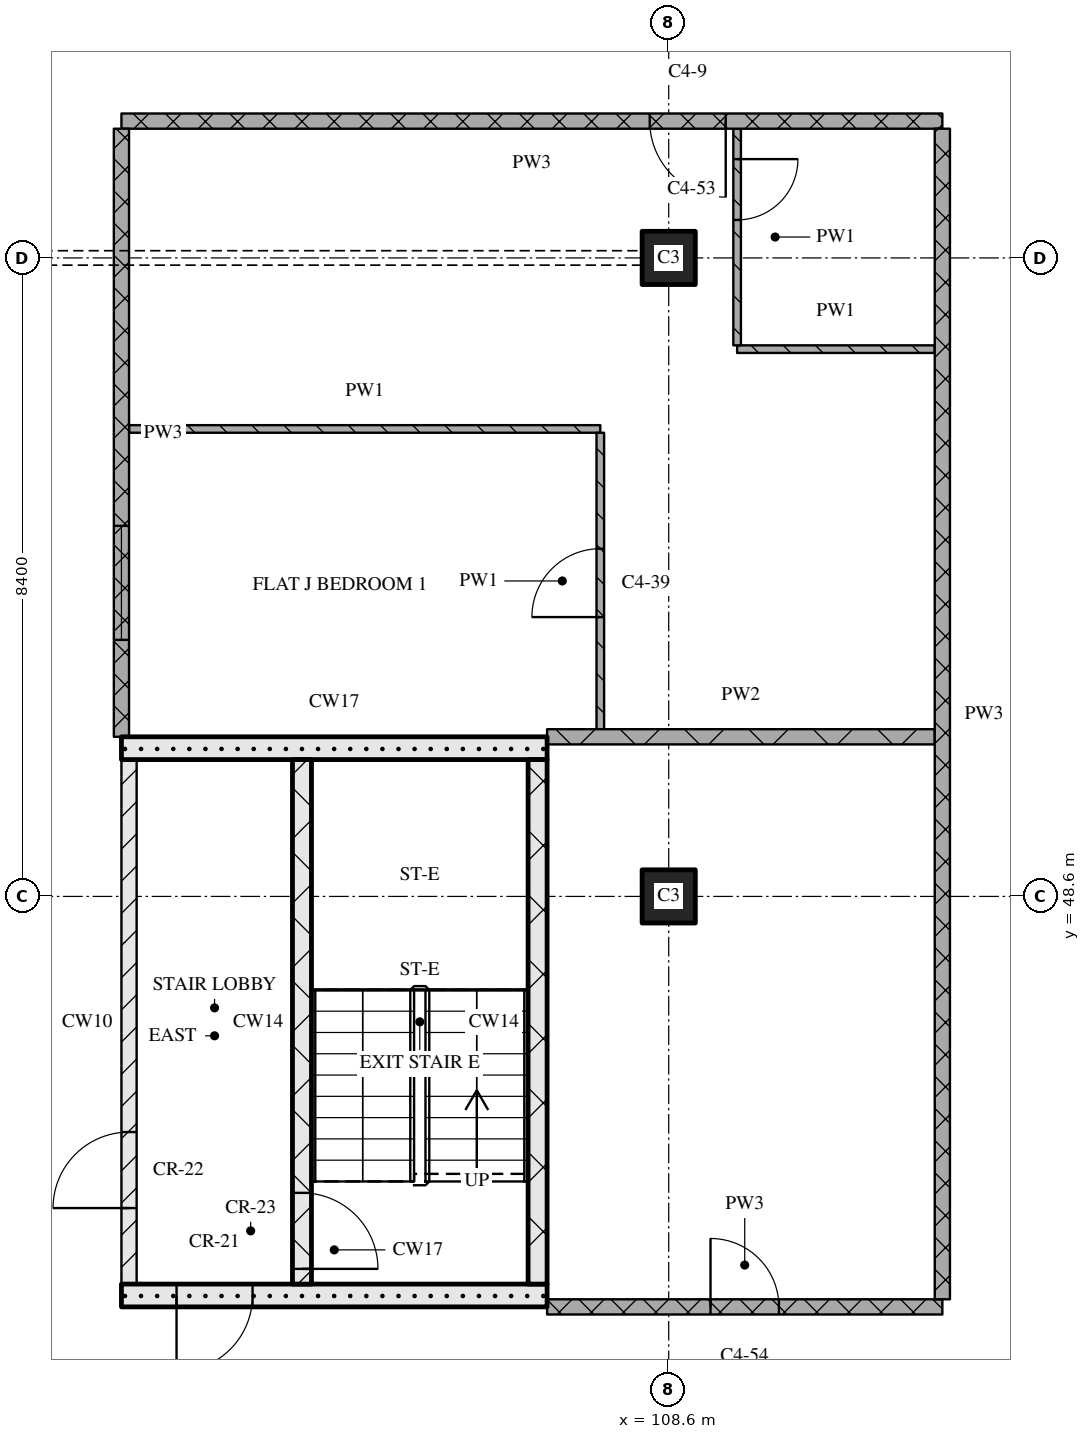
"""IFC4 building model, lengths in metres.
Left out: names, types, materials, properties, quantities, classifications, styles, units other than length and angle.
Written with IfcOpenShell. Run it as: python <this file> out.ifc"""

import sys

from ifc_helpers import new_model, si_unit, direction, frame, frame_2d, origin, origin_2d, place, context, subcontext, project, spatial, rectangle, extrude, element, fill, save


model = new_model("IFC4")
c1 = context("Model", 3, precision=1e-05, world=origin(), true_north=direction((0.0, 1.0)))
c2 = subcontext(c1, "Body", "Model", "MODEL_VIEW")
j1 = project(units=[si_unit("LENGTHUNIT", "METRE"), si_unit("PLANEANGLEUNIT", "RADIAN")], contexts=[c1])
p1 = place(None, origin())
s1 = spatial("IfcSite", under=j1, at=p1, CompositionType="ELEMENT")
p2 = place(p1, origin())
s2 = spatial("IfcBuilding", under=s1, at=p2, CompositionType="ELEMENT")
p3 = place(p2, frame((0.0, 0.0, 183.45)))
s3 = spatial("IfcBuildingStorey", under=s2, at=p3, CompositionType="ELEMENT", Elevation=183.45)
for number, where, z_axis, x_axis in (
    (1, (108.6, 48.6, 0.0), (0.0, 0.0, 1.0), (1.0, 0.0, 0.0)),
    (2, (108.6, 57.0, 0.0), (0.0, 0.0, 1.0), (1.0, 0.0, 0.0)),
):
    element("IfcColumn", number, at=place(p3, frame(where, z_axis=z_axis, x_axis=x_axis)), inside=s3, PredefinedType="COLUMN", context=c2, shape_type="SweptSolid", body=[
        extrude(rectangle(XDim=0.7, YDim=0.7, at=origin_2d()), origin(), (0.0, 0.0, 1.0), 3.6),
    ])
p4 = place(p3, frame((101.4, 43.35, 0.0), z_axis=(0.0, 0.0, 1.0), x_axis=(1.0, 0.0, 0.0)))
e3 = element("IfcWall", 3, at=p4, inside=s3, PredefinedType="SOLIDWALL", context=c2, shape_type="SweptSolid", body=[
    extrude(rectangle(XDim=5.6, YDim=0.3, at=frame_2d((2.8, 0.0))), origin(), (0.0, 0.0, 1.0), 3.32),
])
p5 = place(p4, frame((0.725, 0.0, 0.0)))
e4 = element("IfcOpeningElement", 4, at=p5, cuts=e3, PredefinedType="OPENING", context=c2, shape_type="SweptSolid", body=[
    extrude(rectangle(XDim=1.0, YDim=2.1, at=frame_2d((0.5, 1.05))), frame((0.0, 0.16, 0.0), z_axis=(0.0, -1.0, 0.0), x_axis=(1.0, 0.0, 0.0)), (0.0, 0.0, 1.0), 0.32),
])
p6 = place(p3, frame((101.5, 43.5, 0.0), z_axis=(0.0, 0.0, 1.0), x_axis=(0.0, 1.0, 0.0)))
e5 = element("IfcWall", 5, at=p6, inside=s3, PredefinedType="PARTITIONING", context=c2, shape_type="SweptSolid", body=[
    extrude(rectangle(XDim=6.9, YDim=0.2, at=frame_2d((3.45, 0.0))), origin(), (0.0, 0.0, 1.0), 3.32),
])
p7 = place(p6, frame((1.0, 0.0, 0.0)))
e6 = element("IfcOpeningElement", 6, at=p7, cuts=e5, PredefinedType="OPENING", context=c2, shape_type="SweptSolid", body=[
    extrude(rectangle(XDim=1.0, YDim=2.1, at=frame_2d((0.5, 1.05))), frame((0.0, 0.11, 0.0), z_axis=(0.0, -1.0, 0.0), x_axis=(1.0, 0.0, 0.0)), (0.0, 0.0, 1.0), 0.22),
])
p8 = place(p3, frame((103.775, 43.5, 0.0), z_axis=(0.0, 0.0, 1.0), x_axis=(0.0, 1.0, 0.0)))
e7 = element("IfcWall", 7, at=p8, inside=s3, PredefinedType="SOLIDWALL", context=c2, shape_type="SweptSolid", body=[
    extrude(rectangle(XDim=6.9, YDim=0.25, at=frame_2d((3.45, 0.0))), origin(), (0.0, 0.0, 1.0), 3.32),
])
p9 = place(p8, frame((0.2, 0.0, 0.0)))
e8 = element("IfcOpeningElement", 8, at=p9, cuts=e7, PredefinedType="OPENING", context=c2, shape_type="SweptSolid", body=[
    extrude(rectangle(XDim=1.0, YDim=2.1, at=frame_2d((0.5, 1.05))), frame((0.0, 0.135, 0.0), z_axis=(0.0, -1.0, 0.0), x_axis=(1.0, 0.0, 0.0)), (0.0, 0.0, 1.0), 0.27),
])
p10 = place(p3, frame((106.875, 43.5, 0.0), z_axis=(0.0, 0.0, 1.0), x_axis=(0.0, 1.0, 0.0)))
e9 = element("IfcWall", 9, at=p10, inside=s3, PredefinedType="SOLIDWALL", context=c2, shape_type="SweptSolid", body=[
    extrude(rectangle(XDim=6.9, YDim=0.25, at=frame_2d((3.45, 0.0))), origin(), (0.0, 0.0, 1.0), 3.32),
])
p11 = place(p3, frame((101.4, 50.55, 0.0), z_axis=(0.0, 0.0, 1.0), x_axis=(1.0, 0.0, 0.0)))
e10 = element("IfcWall", 10, at=p11, inside=s3, PredefinedType="SOLIDWALL", context=c2, shape_type="SweptSolid", body=[
    extrude(rectangle(XDim=5.6, YDim=0.3, at=frame_2d((2.8, 0.0))), origin(), (0.0, 0.0, 1.0), 3.32),
])
p12 = place(p3, frame((107.0, 43.2, 0.0), z_axis=(0.0, 0.0, 1.0), x_axis=(1.0, 0.0, 0.0)))
e11 = element("IfcWall", 11, at=p12, inside=s3, PredefinedType="PARTITIONING", context=c2, shape_type="SweptSolid", body=[
    extrude(rectangle(XDim=5.2, YDim=0.2, at=frame_2d((2.6, 0.0))), origin(), (0.0, 0.0, 1.0), 3.32),
])
p13 = place(p12, frame((2.15, 0.0, 0.0)))
e12 = element("IfcOpeningElement", 12, at=p13, cuts=e11, PredefinedType="OPENING", context=c2, shape_type="SweptSolid", body=[
    extrude(rectangle(XDim=0.9, YDim=2.1, at=frame_2d((0.45, 1.05))), frame((0.0, 0.11, 0.0), z_axis=(0.0, -1.0, 0.0), x_axis=(1.0, 0.0, 0.0)), (0.0, 0.0, 1.0), 0.22),
])
p14 = place(p3, frame((107.0, 50.7, 0.0), z_axis=(0.0, 0.0, 1.0), x_axis=(1.0, 0.0, 0.0)))
e13 = element("IfcWall", 13, at=p14, inside=s3, PredefinedType="PARTITIONING", context=c2, shape_type="SweptSolid", body=[
    extrude(rectangle(XDim=5.1, YDim=0.2, at=frame_2d((2.55, 0.0))), origin(), (0.0, 0.0, 1.0), 3.32),
])
p15 = place(p3, frame((101.5, 54.75, 0.0), z_axis=(0.0, 0.0, 1.0), x_axis=(1.0, 0.0, 0.0)))
e14 = element("IfcWall", 14, at=p15, inside=s3, PredefinedType="PARTITIONING", context=c2, shape_type="SweptSolid", body=[
    extrude(rectangle(XDim=6.2, YDim=0.1, at=frame_2d((3.1, 0.0))), origin(), (0.0, 0.0, 1.0), 3.32),
])
p16 = place(p3, frame((109.5, 55.8, 0.0), z_axis=(0.0, 0.0, 1.0), x_axis=(1.0, 0.0, 0.0)))
e15 = element("IfcWall", 15, at=p16, inside=s3, PredefinedType="PARTITIONING", context=c2, shape_type="SweptSolid", body=[
    extrude(rectangle(XDim=2.6, YDim=0.1, at=frame_2d((1.3, 0.0))), origin(), (0.0, 0.0, 1.0), 3.32),
])
p17 = place(p3, frame((112.2, 58.8, 0.0), z_axis=(0.0, 0.0, 1.0), x_axis=(-1.0, 0.0, 0.0)))
e16 = element("IfcWall", 16, at=p17, inside=s3, PredefinedType="PARTITIONING", context=c2, shape_type="SweptSolid", body=[
    extrude(rectangle(XDim=10.8, YDim=0.2, at=frame_2d((5.4, 0.0))), origin(), (0.0, 0.0, 1.0), 3.32),
])
p18 = place(p17, frame((2.85, 0.0, 0.0)))
e17 = element("IfcOpeningElement", 17, at=p18, cuts=e16, PredefinedType="OPENING", context=c2, shape_type="SweptSolid", body=[
    extrude(rectangle(XDim=1.0, YDim=2.1, at=frame_2d((0.5, 1.05))), frame((0.0, 0.11, 0.0), z_axis=(0.0, -1.0, 0.0), x_axis=(1.0, 0.0, 0.0)), (0.0, 0.0, 1.0), 0.22),
])
p19 = place(p3, frame((101.4, 58.7, 0.0), z_axis=(0.0, 0.0, 1.0), x_axis=(0.0, -1.0, 0.0)))
e18 = element("IfcWall", 18, at=p19, inside=s3, PredefinedType="PARTITIONING", context=c2, shape_type="SweptSolid", body=[
    extrude(rectangle(XDim=8.0, YDim=0.2, at=frame_2d((4.0, 0.0))), origin(), (0.0, 0.0, 1.0), 3.32),
])
p20 = place(p19, frame((5.225, 0.0, 0.9)))
e19 = element("IfcOpeningElement", 19, at=p20, cuts=e18, PredefinedType="OPENING", context=c2, shape_type="SweptSolid", body=[
    extrude(rectangle(XDim=1.5, YDim=1.5, at=frame_2d((0.75, 0.75))), frame((0.0, 0.11, 0.0), z_axis=(0.0, -1.0, 0.0), x_axis=(1.0, 0.0, 0.0)), (0.0, 0.0, 1.0), 0.22),
])
p21 = place(p3, frame((107.7, 50.8, 0.0), z_axis=(0.0, 0.0, 1.0), x_axis=(0.0, 1.0, 0.0)))
e20 = element("IfcWall", 20, at=p21, inside=s3, PredefinedType="PARTITIONING", context=c2, shape_type="SweptSolid", body=[
    extrude(rectangle(XDim=3.9, YDim=0.1, at=frame_2d((1.95, 0.0))), origin(), (0.0, 0.0, 1.0), 3.32),
])
p22 = place(p21, frame((1.475, 0.0, 0.0)))
e21 = element("IfcOpeningElement", 21, at=p22, cuts=e20, PredefinedType="OPENING", context=c2, shape_type="SweptSolid", body=[
    extrude(rectangle(XDim=0.9, YDim=2.1, at=frame_2d((0.45, 1.05))), frame((0.0, 0.06, 0.0), z_axis=(0.0, -1.0, 0.0), x_axis=(1.0, 0.0, 0.0)), (0.0, 0.0, 1.0), 0.12),
])
p23 = place(p3, frame((109.5, 58.7, 0.0), z_axis=(0.0, 0.0, 1.0), x_axis=(0.0, -1.0, 0.0)))
e22 = element("IfcWall", 22, at=p23, inside=s3, PredefinedType="PARTITIONING", context=c2, shape_type="SweptSolid", body=[
    extrude(rectangle(XDim=2.85, YDim=0.1, at=frame_2d((1.425, 0.0))), origin(), (0.0, 0.0, 1.0), 3.32),
])
p24 = place(p23, frame((0.4, 0.0, 0.0)))
e23 = element("IfcOpeningElement", 23, at=p24, cuts=e22, PredefinedType="OPENING", context=c2, shape_type="SweptSolid", body=[
    extrude(rectangle(XDim=0.8, YDim=2.1, at=frame_2d((0.4, 1.05))), frame((0.0, 0.06, 0.0), z_axis=(0.0, -1.0, 0.0), x_axis=(1.0, 0.0, 0.0)), (0.0, 0.0, 1.0), 0.12),
])
p25 = place(p3, frame((112.2, 58.7, 0.0), z_axis=(0.0, 0.0, 1.0), x_axis=(0.0, -1.0, 0.0)))
e24 = element("IfcWall", 24, at=p25, inside=s3, PredefinedType="PARTITIONING", context=c2, shape_type="SweptSolid", body=[
    extrude(rectangle(XDim=15.4, YDim=0.2, at=frame_2d((7.7, 0.0))), origin(), (0.0, 0.0, 1.0), 3.32),
])
p26 = place(p5, origin())
e25 = element("IfcDoor", 25, at=p26, inside=s3, OperationType="SINGLE_SWING_RIGHT", PredefinedType="DOOR", context=c2, shape_type="SweptSolid", body=[
    extrude(rectangle(XDim=1.0, YDim=2.1, at=frame_2d((0.5, 1.05))), frame((0.0, 0.025, 0.0), z_axis=(0.0, -1.0, 0.0), x_axis=(1.0, 0.0, 0.0)), (0.0, 0.0, 1.0), 0.05),
])
fill(e4, e25)
p27 = place(p9, origin())
e26 = element("IfcDoor", 26, at=p27, inside=s3, OperationType="SINGLE_SWING_RIGHT", PredefinedType="DOOR", context=c2, shape_type="SweptSolid", body=[
    extrude(rectangle(XDim=1.0, YDim=2.1, at=frame_2d((0.5, 1.05))), frame((0.0, 0.025, 0.0), z_axis=(0.0, -1.0, 0.0), x_axis=(1.0, 0.0, 0.0)), (0.0, 0.0, 1.0), 0.05),
])
fill(e8, e26)
p28 = place(p7, origin())
e27 = element("IfcDoor", 27, at=p28, inside=s3, OperationType="SINGLE_SWING_LEFT", PredefinedType="DOOR", context=c2, shape_type="SweptSolid", body=[
    extrude(rectangle(XDim=1.0, YDim=2.1, at=frame_2d((0.5, 1.05))), frame((0.0, 0.025, 0.0), z_axis=(0.0, -1.0, 0.0), x_axis=(1.0, 0.0, 0.0)), (0.0, 0.0, 1.0), 0.05),
])
fill(e6, e27)
p29 = place(p13, origin())
e28 = element("IfcDoor", 28, at=p29, inside=s3, OperationType="SINGLE_SWING_LEFT", PredefinedType="DOOR", context=c2, shape_type="SweptSolid", body=[
    extrude(rectangle(XDim=0.9, YDim=2.1, at=frame_2d((0.45, 1.05))), frame((0.0, 0.025, 0.0), z_axis=(0.0, -1.0, 0.0), x_axis=(1.0, 0.0, 0.0)), (0.0, 0.0, 1.0), 0.05),
])
fill(e12, e28)
p30 = place(p18, origin())
e29 = element("IfcDoor", 29, at=p30, inside=s3, OperationType="SINGLE_SWING_LEFT", PredefinedType="DOOR", context=c2, shape_type="SweptSolid", body=[
    extrude(rectangle(XDim=1.0, YDim=2.1, at=frame_2d((0.5, 1.05))), frame((0.0, 0.025, 0.0), z_axis=(0.0, -1.0, 0.0), x_axis=(1.0, 0.0, 0.0)), (0.0, 0.0, 1.0), 0.05),
])
fill(e17, e29)
p31 = place(p22, origin())
e30 = element("IfcDoor", 30, at=p31, inside=s3, OperationType="SINGLE_SWING_LEFT", PredefinedType="DOOR", context=c2, shape_type="SweptSolid", body=[
    extrude(rectangle(XDim=0.9, YDim=2.1, at=frame_2d((0.45, 1.05))), frame((0.0, 0.025, 0.0), z_axis=(0.0, -1.0, 0.0), x_axis=(1.0, 0.0, 0.0)), (0.0, 0.0, 1.0), 0.05),
])
fill(e21, e30)
p32 = place(p24, origin())
e31 = element("IfcDoor", 31, at=p32, inside=s3, OperationType="SINGLE_SWING_LEFT", PredefinedType="DOOR", context=c2, shape_type="SweptSolid", body=[
    extrude(rectangle(XDim=0.8, YDim=2.1, at=frame_2d((0.4, 1.05))), frame((0.0, 0.025, 0.0), z_axis=(0.0, -1.0, 0.0), x_axis=(1.0, 0.0, 0.0)), (0.0, 0.0, 1.0), 0.05),
])
fill(e23, e31)
p33 = place(p20, origin())
e32 = element("IfcWindow", 32, at=p33, inside=s3, PartitioningType="SINGLE_PANEL", PredefinedType="WINDOW", context=c2, shape_type="SweptSolid", body=[
    extrude(rectangle(XDim=1.5, YDim=1.5, at=frame_2d((0.75, 0.75))), frame((0.0, 0.03, 0.0), z_axis=(0.0, -1.0, 0.0), x_axis=(1.0, 0.0, 0.0)), (0.0, 0.0, 1.0), 0.06),
])
fill(e19, e32)
save(model, sys.argv[1])
